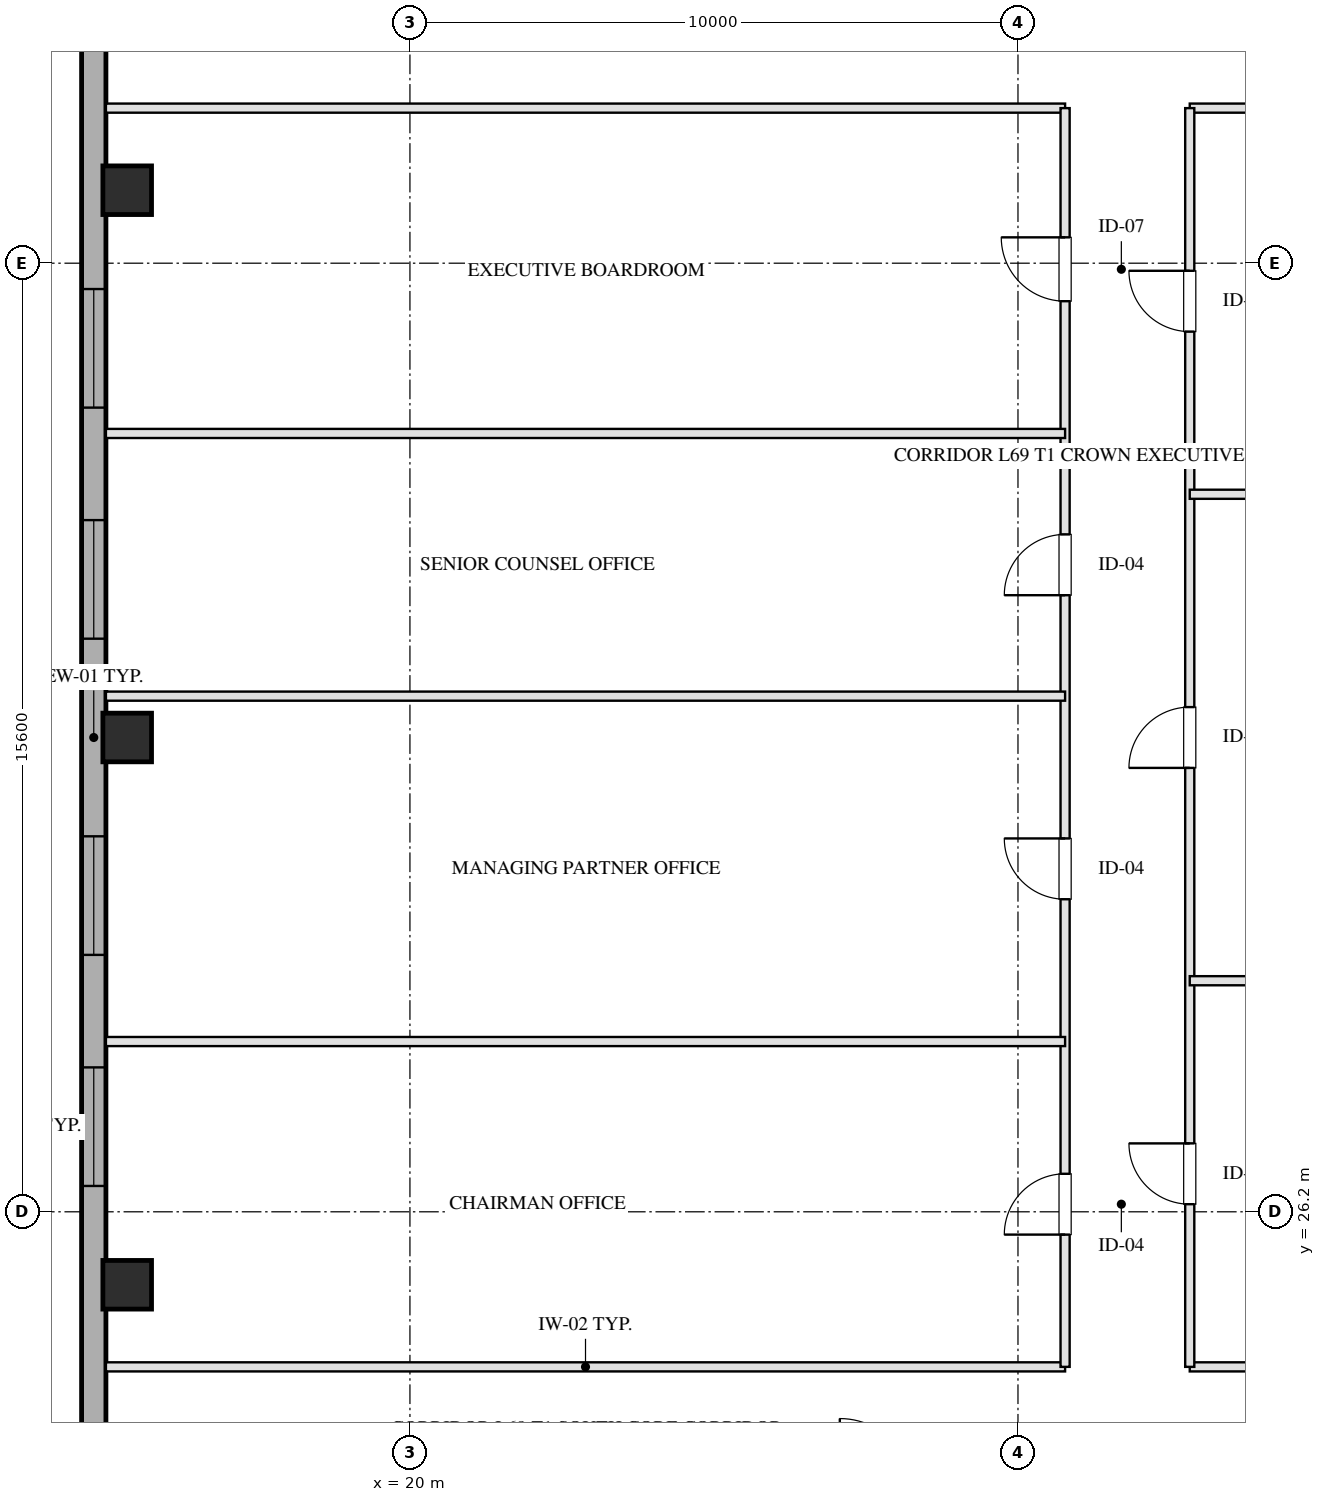
"""IFC4 building model, lengths in metres.
Left out: names, types, materials, properties, quantities, classifications, styles, units other than length and angle.
Written with IfcOpenShell. Run it as: python <this file> out.ifc"""

import sys

from ifc_helpers import new_model, si_unit, direction, frame, frame_2d, origin, origin_2d, place, context, subcontext, project, spatial, rectangle, hollow_rectangle, extrude, element, fill, save


model = new_model("IFC4")
c1 = context("Model", 3, precision=1e-05, world=origin(), true_north=direction((0.0, 1.0)))
c2 = subcontext(c1, "Body", "Model", "MODEL_VIEW")
j1 = project(units=[si_unit("LENGTHUNIT", "METRE"), si_unit("PLANEANGLEUNIT", "RADIAN")], contexts=[c1])
p1 = place(None, origin())
s1 = spatial("IfcSite", under=j1, at=p1, CompositionType="ELEMENT")
p2 = place(p1, origin())
s2 = spatial("IfcBuilding", under=s1, at=p2, CompositionType="ELEMENT")
p3 = place(p2, frame((0.0, 0.0, 253.6)))
s3 = spatial("IfcBuildingStorey", under=s2, at=p3, CompositionType="ELEMENT", Elevation=253.6)
for number, where, z_axis, x_axis in (
    (1, (15.35, 25.0, 0.0), (0.0, 0.0, 1.0), (1.0, 0.0, 0.0)),
    (2, (15.35, 34.0, 0.0), (0.0, 0.0, 1.0), (1.0, 0.0, 0.0)),
    (3, (15.35, 43.0, 0.0), (0.0, 0.0, 1.0), (1.0, 0.0, 0.0)),
):
    element("IfcColumn", number, at=place(p3, frame(where, z_axis=z_axis, x_axis=x_axis)), inside=s3, PredefinedType="COLUMN", context=c2, shape_type="SweptSolid", body=[
        extrude(hollow_rectangle(XDim=0.8, YDim=0.8, WallThickness=0.028, at=origin_2d()), origin(), (0.0, 0.0, 1.0), 3.201),
    ])
p4 = place(p3, frame((14.8, 13.1, 0.0), z_axis=(0.0, 0.0, 1.0), x_axis=(0.0, 1.0, 0.0)))
e4 = element("IfcWall", 4, at=p4, inside=s3, PredefinedType="SOLIDWALL", context=c2, shape_type="SweptSolid", body=[
    extrude(rectangle(XDim=41.8, YDim=0.4, at=frame_2d((20.9, 0.0))), origin(), (0.0, 0.0, 1.0), 2.36),
])
p5 = place(p4, frame((13.525, 0.0, 0.75)))
e5 = element("IfcOpeningElement", 5, at=p5, cuts=e4, PredefinedType="OPENING", context=c2, shape_type="SweptSolid", body=[
    extrude(rectangle(XDim=1.95, YDim=1.21, at=frame_2d((0.975, 0.605))), frame((0.0, 0.21, 0.0), z_axis=(0.0, -1.0, 0.0), x_axis=(1.0, 0.0, 0.0)), (0.0, 0.0, 1.0), 0.42),
])
p6 = place(p4, frame((17.325, 0.0, 0.75)))
e6 = element("IfcOpeningElement", 6, at=p6, cuts=e4, PredefinedType="OPENING", context=c2, shape_type="SweptSolid", body=[
    extrude(rectangle(XDim=1.95, YDim=1.21, at=frame_2d((0.975, 0.605))), frame((0.0, 0.21, 0.0), z_axis=(0.0, -1.0, 0.0), x_axis=(1.0, 0.0, 0.0)), (0.0, 0.0, 1.0), 0.42),
])
p7 = place(p4, frame((22.525, 0.0, 0.75)))
e7 = element("IfcOpeningElement", 7, at=p7, cuts=e4, PredefinedType="OPENING", context=c2, shape_type="SweptSolid", body=[
    extrude(rectangle(XDim=1.95, YDim=1.21, at=frame_2d((0.975, 0.605))), frame((0.0, 0.21, 0.0), z_axis=(0.0, -1.0, 0.0), x_axis=(1.0, 0.0, 0.0)), (0.0, 0.0, 1.0), 0.42),
])
p8 = place(p4, frame((26.325, 0.0, 0.75)))
e8 = element("IfcOpeningElement", 8, at=p8, cuts=e4, PredefinedType="OPENING", context=c2, shape_type="SweptSolid", body=[
    extrude(rectangle(XDim=1.95, YDim=1.21, at=frame_2d((0.975, 0.605))), frame((0.0, 0.21, 0.0), z_axis=(0.0, -1.0, 0.0), x_axis=(1.0, 0.0, 0.0)), (0.0, 0.0, 1.0), 0.42),
])
p9 = place(p3, frame((15.0, 23.65, 0.0), z_axis=(0.0, 0.0, 1.0), x_axis=(1.0, 0.0, 0.0)))
e9 = element("IfcWall", 9, at=p9, inside=s3, PredefinedType="PARTITIONING", context=c2, shape_type="SweptSolid", body=[
    extrude(rectangle(XDim=15.775, YDim=0.15, at=frame_2d((7.887, 0.0))), origin(), (0.0, 0.0, 1.0), 2.925),
])
p10 = place(p3, frame((32.825, 23.65, 0.0), z_axis=(0.0, 0.0, 1.0), x_axis=(1.0, 0.0, 0.0)))
e10 = element("IfcWall", 10, at=p10, inside=s3, PredefinedType="PARTITIONING", context=c2, shape_type="SweptSolid", body=[
    extrude(rectangle(XDim=12.175, YDim=0.15, at=frame_2d((6.087, 0.0))), origin(), (0.0, 0.0, 1.0), 2.925),
])
p11 = place(p3, frame((15.0, 44.35, 0.0), z_axis=(0.0, 0.0, 1.0), x_axis=(1.0, 0.0, 0.0)))
e11 = element("IfcWall", 11, at=p11, inside=s3, PredefinedType="PARTITIONING", context=c2, shape_type="SweptSolid", body=[
    extrude(rectangle(XDim=15.775, YDim=0.15, at=frame_2d((7.887, 0.0))), origin(), (0.0, 0.0, 1.0), 2.925),
])
p12 = place(p3, frame((32.825, 44.35, 0.0), z_axis=(0.0, 0.0, 1.0), x_axis=(1.0, 0.0, 0.0)))
e12 = element("IfcWall", 12, at=p12, inside=s3, PredefinedType="PARTITIONING", context=c2, shape_type="SweptSolid", body=[
    extrude(rectangle(XDim=12.175, YDim=0.15, at=frame_2d((6.087, 0.0))), origin(), (0.0, 0.0, 1.0), 2.925),
])
p13 = place(p3, frame((30.775, 23.65, 0.0), z_axis=(0.0, 0.0, 1.0), x_axis=(0.0, 1.0, 0.0)))
e13 = element("IfcWall", 13, at=p13, inside=s3, PredefinedType="PARTITIONING", context=c2, shape_type="SweptSolid", body=[
    extrude(rectangle(XDim=20.7, YDim=0.15, at=frame_2d((10.35, 0.0))), origin(), (0.0, 0.0, 1.0), 2.925),
])
p14 = place(p13, frame((2.175, 0.0, 0.0)))
e14 = element("IfcOpeningElement", 14, at=p14, cuts=e13, PredefinedType="OPENING", context=c2, shape_type="SweptSolid", body=[
    extrude(rectangle(XDim=1.0, YDim=2.05, at=frame_2d((0.5, 1.025))), frame((0.0, 0.085, 0.0), z_axis=(0.0, -1.0, 0.0), x_axis=(1.0, 0.0, 0.0)), (0.0, 0.0, 1.0), 0.17),
])
p15 = place(p13, frame((7.69, 0.0, 0.0)))
e15 = element("IfcOpeningElement", 15, at=p15, cuts=e13, PredefinedType="OPENING", context=c2, shape_type="SweptSolid", body=[
    extrude(rectangle(XDim=1.0, YDim=2.05, at=frame_2d((0.5, 1.025))), frame((0.0, 0.085, 0.0), z_axis=(0.0, -1.0, 0.0), x_axis=(1.0, 0.0, 0.0)), (0.0, 0.0, 1.0), 0.17),
])
p16 = place(p13, frame((12.69, 0.0, 0.0)))
e16 = element("IfcOpeningElement", 16, at=p16, cuts=e13, PredefinedType="OPENING", context=c2, shape_type="SweptSolid", body=[
    extrude(rectangle(XDim=1.0, YDim=2.05, at=frame_2d((0.5, 1.025))), frame((0.0, 0.085, 0.0), z_axis=(0.0, -1.0, 0.0), x_axis=(1.0, 0.0, 0.0)), (0.0, 0.0, 1.0), 0.17),
])
p17 = place(p13, frame((17.525, 0.0, 0.0)))
e17 = element("IfcOpeningElement", 17, at=p17, cuts=e13, PredefinedType="OPENING", context=c2, shape_type="SweptSolid", body=[
    extrude(rectangle(XDim=1.05, YDim=2.05, at=frame_2d((0.525, 1.025))), frame((0.0, 0.085, 0.0), z_axis=(0.0, -1.0, 0.0), x_axis=(1.0, 0.0, 0.0)), (0.0, 0.0, 1.0), 0.17),
])
p18 = place(p3, frame((32.825, 23.65, 0.0), z_axis=(0.0, 0.0, 1.0), x_axis=(0.0, 1.0, 0.0)))
e18 = element("IfcWall", 18, at=p18, inside=s3, PredefinedType="PARTITIONING", context=c2, shape_type="SweptSolid", body=[
    extrude(rectangle(XDim=20.7, YDim=0.15, at=frame_2d((10.35, 0.0))), origin(), (0.0, 0.0, 1.0), 2.925),
])
p19 = place(p18, frame((2.675, 0.0, 0.0)))
e19 = element("IfcOpeningElement", 19, at=p19, cuts=e18, PredefinedType="OPENING", context=c2, shape_type="SweptSolid", body=[
    extrude(rectangle(XDim=1.0, YDim=2.05, at=frame_2d((0.5, 1.025))), frame((0.0, 0.085, 0.0), z_axis=(0.0, -1.0, 0.0), x_axis=(1.0, 0.0, 0.0)), (0.0, 0.0, 1.0), 0.17),
])
p20 = place(p18, frame((9.85, 0.0, 0.0)))
e20 = element("IfcOpeningElement", 20, at=p20, cuts=e18, PredefinedType="OPENING", context=c2, shape_type="SweptSolid", body=[
    extrude(rectangle(XDim=1.0, YDim=2.05, at=frame_2d((0.5, 1.025))), frame((0.0, 0.085, 0.0), z_axis=(0.0, -1.0, 0.0), x_axis=(1.0, 0.0, 0.0)), (0.0, 0.0, 1.0), 0.17),
])
p21 = place(p18, frame((17.025, 0.0, 0.0)))
e21 = element("IfcOpeningElement", 21, at=p21, cuts=e18, PredefinedType="OPENING", context=c2, shape_type="SweptSolid", body=[
    extrude(rectangle(XDim=1.0, YDim=2.05, at=frame_2d((0.5, 1.025))), frame((0.0, 0.085, 0.0), z_axis=(0.0, -1.0, 0.0), x_axis=(1.0, 0.0, 0.0)), (0.0, 0.0, 1.0), 0.17),
])
for number, where, z_axis, x_axis in (
    (22, (15.0, 29.0, 0.0), (0.0, 0.0, 1.0), (1.0, 0.0, 0.0)),
    (23, (15.0, 34.68, 0.0), (0.0, 0.0, 1.0), (1.0, 0.0, 0.0)),
    (24, (15.0, 39.0, 0.0), (0.0, 0.0, 1.0), (1.0, 0.0, 0.0)),
):
    element("IfcWall", number, at=place(p3, frame(where, z_axis=z_axis, x_axis=x_axis)), inside=s3, PredefinedType="PARTITIONING", context=c2, shape_type="SweptSolid", body=[
        extrude(rectangle(XDim=15.775, YDim=0.15, at=frame_2d((7.887, 0.0))), origin(), (0.0, 0.0, 1.0), 2.925),
    ])
for number, where, z_axis, x_axis in (
    (25, (32.825, 30.0, 0.0), (0.0, 0.0, 1.0), (1.0, 0.0, 0.0)),
    (26, (32.825, 38.0, 0.0), (0.0, 0.0, 1.0), (1.0, 0.0, 0.0)),
):
    element("IfcWall", number, at=place(p3, frame(where, z_axis=z_axis, x_axis=x_axis)), inside=s3, PredefinedType="PARTITIONING", context=c2, shape_type="SweptSolid", body=[
        extrude(rectangle(XDim=12.175, YDim=0.15, at=frame_2d((6.087, 0.0))), origin(), (0.0, 0.0, 1.0), 2.925),
    ])
p22 = place(p5, origin())
e27 = element("IfcWindow", 27, at=p22, inside=s3, PartitioningType="TRIPLE_PANEL_VERTICAL", PredefinedType="WINDOW", context=c2, shape_type="SweptSolid", body=[
    extrude(rectangle(XDim=1.95, YDim=1.21, at=frame_2d((0.975, 0.605))), frame((0.0, 0.03, 0.0), z_axis=(0.0, -1.0, 0.0), x_axis=(1.0, 0.0, 0.0)), (0.0, 0.0, 1.0), 0.06),
])
fill(e5, e27)
p23 = place(p6, origin())
e28 = element("IfcWindow", 28, at=p23, inside=s3, PartitioningType="TRIPLE_PANEL_VERTICAL", PredefinedType="WINDOW", context=c2, shape_type="SweptSolid", body=[
    extrude(rectangle(XDim=1.95, YDim=1.21, at=frame_2d((0.975, 0.605))), frame((0.0, 0.03, 0.0), z_axis=(0.0, -1.0, 0.0), x_axis=(1.0, 0.0, 0.0)), (0.0, 0.0, 1.0), 0.06),
])
fill(e6, e28)
p24 = place(p7, origin())
e29 = element("IfcWindow", 29, at=p24, inside=s3, PartitioningType="TRIPLE_PANEL_VERTICAL", PredefinedType="WINDOW", context=c2, shape_type="SweptSolid", body=[
    extrude(rectangle(XDim=1.95, YDim=1.21, at=frame_2d((0.975, 0.605))), frame((0.0, 0.03, 0.0), z_axis=(0.0, -1.0, 0.0), x_axis=(1.0, 0.0, 0.0)), (0.0, 0.0, 1.0), 0.06),
])
fill(e7, e29)
p25 = place(p8, origin())
e30 = element("IfcWindow", 30, at=p25, inside=s3, PartitioningType="TRIPLE_PANEL_VERTICAL", PredefinedType="WINDOW", context=c2, shape_type="SweptSolid", body=[
    extrude(rectangle(XDim=1.95, YDim=1.21, at=frame_2d((0.975, 0.605))), frame((0.0, 0.03, 0.0), z_axis=(0.0, -1.0, 0.0), x_axis=(1.0, 0.0, 0.0)), (0.0, 0.0, 1.0), 0.06),
])
fill(e8, e30)
p26 = place(p14, origin())
e31 = element("IfcDoor", 31, at=p26, inside=s3, OperationType="SINGLE_SWING_LEFT", PredefinedType="DOOR", context=c2, shape_type="SweptSolid", body=[
    extrude(rectangle(XDim=1.0, YDim=2.05, at=frame_2d((0.5, 1.025))), frame((0.0, 0.025, 0.0), z_axis=(0.0, -1.0, 0.0), x_axis=(1.0, 0.0, 0.0)), (0.0, 0.0, 1.0), 0.05),
])
fill(e14, e31)
p27 = place(p15, origin())
e32 = element("IfcDoor", 32, at=p27, inside=s3, OperationType="SINGLE_SWING_RIGHT", PredefinedType="DOOR", context=c2, shape_type="SweptSolid", body=[
    extrude(rectangle(XDim=1.0, YDim=2.05, at=frame_2d((0.5, 1.025))), frame((0.0, 0.025, 0.0), z_axis=(0.0, -1.0, 0.0), x_axis=(1.0, 0.0, 0.0)), (0.0, 0.0, 1.0), 0.05),
])
fill(e15, e32)
p28 = place(p16, origin())
e33 = element("IfcDoor", 33, at=p28, inside=s3, OperationType="SINGLE_SWING_LEFT", PredefinedType="DOOR", context=c2, shape_type="SweptSolid", body=[
    extrude(rectangle(XDim=1.0, YDim=2.05, at=frame_2d((0.5, 1.025))), frame((0.0, 0.025, 0.0), z_axis=(0.0, -1.0, 0.0), x_axis=(1.0, 0.0, 0.0)), (0.0, 0.0, 1.0), 0.05),
])
fill(e16, e33)
p29 = place(p17, origin())
e34 = element("IfcDoor", 34, at=p29, inside=s3, OperationType="SINGLE_SWING_RIGHT", PredefinedType="DOOR", context=c2, shape_type="SweptSolid", body=[
    extrude(rectangle(XDim=1.05, YDim=2.05, at=frame_2d((0.525, 1.025))), frame((0.0, 0.025, 0.0), z_axis=(0.0, -1.0, 0.0), x_axis=(1.0, 0.0, 0.0)), (0.0, 0.0, 1.0), 0.05),
])
fill(e17, e34)
p30 = place(p19, origin())
e35 = element("IfcDoor", 35, at=p30, inside=s3, OperationType="SINGLE_SWING_RIGHT", PredefinedType="DOOR", context=c2, shape_type="SweptSolid", body=[
    extrude(rectangle(XDim=1.0, YDim=2.05, at=frame_2d((0.5, 1.025))), frame((0.0, 0.025, 0.0), z_axis=(0.0, -1.0, 0.0), x_axis=(1.0, 0.0, 0.0)), (0.0, 0.0, 1.0), 0.05),
])
fill(e19, e35)
p31 = place(p20, origin())
e36 = element("IfcDoor", 36, at=p31, inside=s3, OperationType="SINGLE_SWING_LEFT", PredefinedType="DOOR", context=c2, shape_type="SweptSolid", body=[
    extrude(rectangle(XDim=1.0, YDim=2.05, at=frame_2d((0.5, 1.025))), frame((0.0, 0.025, 0.0), z_axis=(0.0, -1.0, 0.0), x_axis=(1.0, 0.0, 0.0)), (0.0, 0.0, 1.0), 0.05),
])
fill(e20, e36)
p32 = place(p21, origin())
e37 = element("IfcDoor", 37, at=p32, inside=s3, OperationType="SINGLE_SWING_RIGHT", PredefinedType="DOOR", context=c2, shape_type="SweptSolid", body=[
    extrude(rectangle(XDim=1.0, YDim=2.05, at=frame_2d((0.5, 1.025))), frame((0.0, 0.025, 0.0), z_axis=(0.0, -1.0, 0.0), x_axis=(1.0, 0.0, 0.0)), (0.0, 0.0, 1.0), 0.05),
])
fill(e21, e37)
save(model, sys.argv[1])
